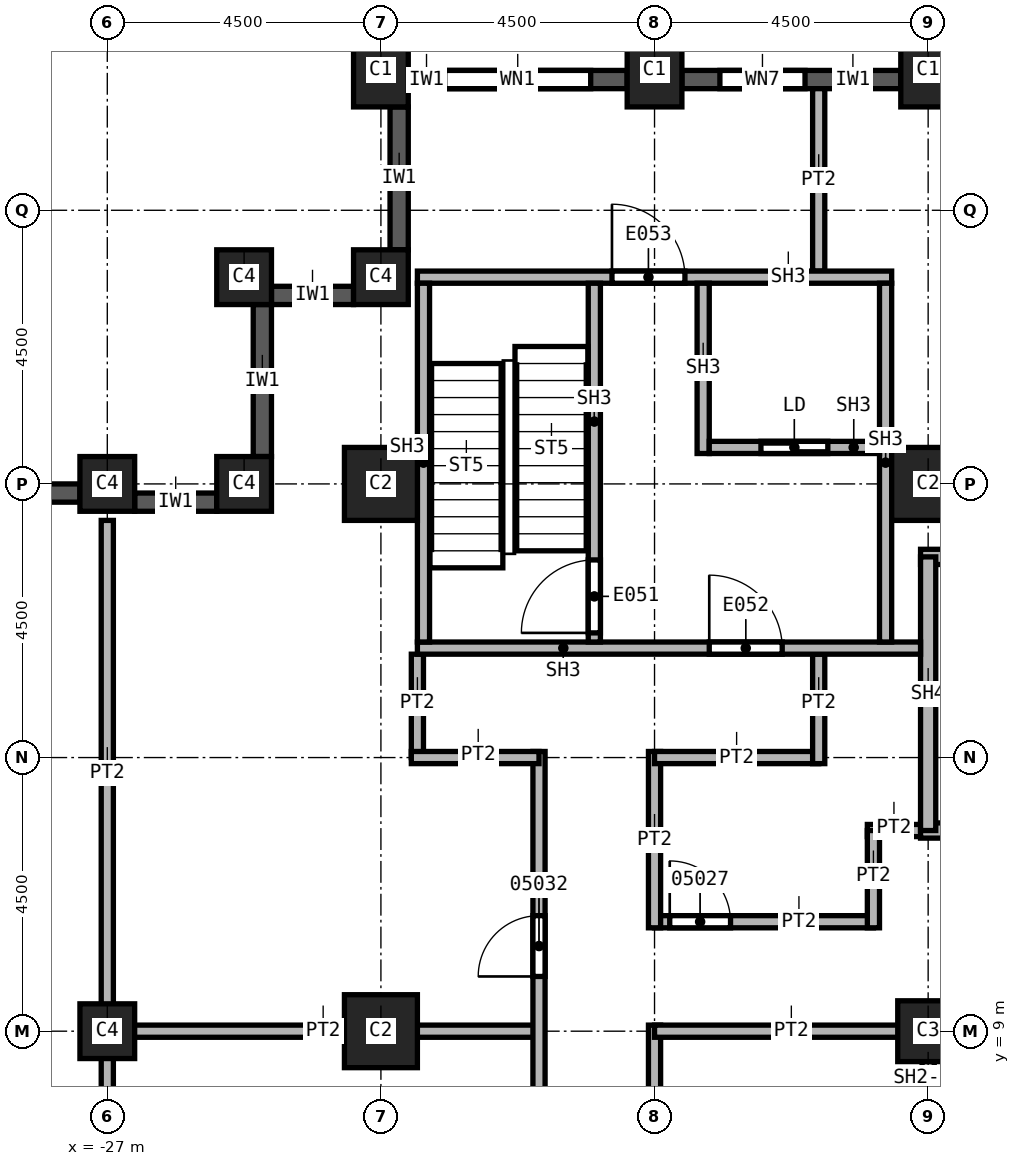
"""IFC4 building model, lengths in metres.
Left out: names, types, materials, properties, quantities, classifications, styles, units other than length and angle.
Written with IfcOpenShell. Run it as: python <this file> out.ifc"""

import sys

from ifc_helpers import new_model, si_unit, direction, frame, frame_2d, origin, origin_2d, place, context, subcontext, project, spatial, rectangle, extrude, element, fill, save


model = new_model("IFC4")
c1 = context("Model", 3, precision=1e-05, world=origin(), true_north=direction((0.0, 1.0)))
c2 = subcontext(c1, "Body", "Model", "MODEL_VIEW")
j1 = project(units=[si_unit("LENGTHUNIT", "METRE"), si_unit("PLANEANGLEUNIT", "RADIAN")], contexts=[c1])
p1 = place(None, origin())
s1 = spatial("IfcSite", under=j1, at=p1, CompositionType="ELEMENT")
p2 = place(p1, origin())
s2 = spatial("IfcBuilding", under=s1, at=p2, CompositionType="ELEMENT")
p3 = place(p2, frame((0.0, 0.0, 116.0)))
s3 = spatial("IfcBuildingStorey", under=s2, at=p3, CompositionType="ELEMENT", Elevation=116.0)
for number, where, z_axis, x_axis in (
    (1, (-13.5, 18.0, 0.0), (0.0, 0.0, 1.0), (1.0, 0.0, 0.0)),
    (2, (-22.5, 9.0, 0.0), (0.0, 0.0, 1.0), (1.0, 0.0, 0.0)),
    (3, (-22.5, 18.0, 0.0), (0.0, 0.0, 1.0), (1.0, 0.0, 0.0)),
):
    element("IfcColumn", number, at=place(p3, frame(where, z_axis=z_axis, x_axis=x_axis)), inside=s3, PredefinedType="COLUMN", context=c2, shape_type="SweptSolid", body=[
        extrude(rectangle(XDim=1.2, YDim=1.2, at=origin_2d()), origin(), (0.0, 0.0, 1.0), 3.6),
    ])
p4 = place(p3, frame((-13.5, 9.0, 0.0), z_axis=(0.0, 0.0, 1.0), x_axis=(1.0, 0.0, 0.0)))
e4 = element("IfcColumn", 4, at=p4, inside=s3, PredefinedType="COLUMN", context=c2, shape_type="SweptSolid", body=[
    extrude(rectangle(XDim=1.0, YDim=1.0, at=origin_2d()), origin(), (0.0, 0.0, 1.0), 3.6),
])
for number, where, z_axis, x_axis in (
    (5, (-13.5, 24.8, 0.0), (0.0, 0.0, 1.0), (1.0, 0.0, 0.0)),
    (6, (-18.0, 24.8, 0.0), (0.0, 0.0, 1.0), (1.0, 0.0, 0.0)),
    (7, (-22.5, 24.8, 0.0), (0.0, 0.0, 1.0), (1.0, 0.0, 0.0)),
):
    element("IfcColumn", number, at=place(p3, frame(where, z_axis=z_axis, x_axis=x_axis)), inside=s3, PredefinedType="COLUMN", context=c2, shape_type="SweptSolid", body=[
        extrude(rectangle(XDim=0.9, YDim=1.2, at=origin_2d()), origin(), (0.0, 0.0, 1.0), 3.6),
    ])
for number, where, z_axis, x_axis in (
    (8, (-27.0, 9.0, 0.0), (0.0, 0.0, 1.0), (1.0, 0.0, 0.0)),
    (9, (-27.0, 18.0, 0.0), (0.0, 0.0, 1.0), (1.0, 0.0, 0.0)),
    (10, (-22.5, 21.4, 0.0), (0.0, 0.0, 1.0), (1.0, 0.0, 0.0)),
    (11, (-24.75, 21.4, 0.0), (0.0, 0.0, 1.0), (1.0, 0.0, 0.0)),
    (12, (-24.75, 18.0, 0.0), (0.0, 0.0, 1.0), (1.0, 0.0, 0.0)),
):
    element("IfcColumn", number, at=place(p3, frame(where, z_axis=z_axis, x_axis=x_axis)), inside=s3, PredefinedType="COLUMN", context=c2, shape_type="SweptSolid", body=[
        extrude(rectangle(XDim=0.9, YDim=0.9, at=origin_2d()), origin(), (0.0, 0.0, 1.0), 3.6),
    ])
p5 = place(p3, frame((-22.2, 24.2, 0.0), z_axis=(0.0, 0.0, 1.0), x_axis=(0.0, -1.0, 0.0)))
e13 = element("IfcWall", 13, at=p5, inside=s3, PredefinedType="SOLIDWALL", context=c2, shape_type="SweptSolid", body=[
    extrude(rectangle(XDim=2.35, YDim=0.3, at=frame_2d((1.175, 0.0))), origin(), (0.0, 0.0, 1.0), 3.0),
])
p6 = place(p3, frame((-22.95, 21.1, 0.0), z_axis=(0.0, 0.0, 1.0), x_axis=(-1.0, 0.0, 0.0)))
e14 = element("IfcWall", 14, at=p6, inside=s3, PredefinedType="SOLIDWALL", context=c2, shape_type="SweptSolid", body=[
    extrude(rectangle(XDim=1.35, YDim=0.3, at=frame_2d((0.675, 0.0))), origin(), (0.0, 0.0, 1.0), 3.0),
])
p7 = place(p3, frame((-24.45, 20.95, 0.0), z_axis=(0.0, 0.0, 1.0), x_axis=(0.0, -1.0, 0.0)))
e15 = element("IfcWall", 15, at=p7, inside=s3, PredefinedType="SOLIDWALL", context=c2, shape_type="SweptSolid", body=[
    extrude(rectangle(XDim=2.5, YDim=0.3, at=frame_2d((1.25, 0.0))), origin(), (0.0, 0.0, 1.0), 3.0),
])
p8 = place(p3, frame((-25.2, 17.7, 0.0), z_axis=(0.0, 0.0, 1.0), x_axis=(-1.0, 0.0, 0.0)))
e16 = element("IfcWall", 16, at=p8, inside=s3, PredefinedType="SOLIDWALL", context=c2, shape_type="SweptSolid", body=[
    extrude(rectangle(XDim=1.35, YDim=0.3, at=frame_2d((0.675, 0.0))), origin(), (0.0, 0.0, 1.0), 3.0),
])
p9 = place(p3, frame((-27.45, 17.85, 0.0), z_axis=(0.0, 0.0, 1.0), x_axis=(-1.0, 0.0, 0.0)))
e17 = element("IfcWall", 17, at=p9, inside=s3, PredefinedType="SOLIDWALL", context=c2, shape_type="SweptSolid", body=[
    extrude(rectangle(XDim=3.6, YDim=0.3, at=frame_2d((1.8, 0.0))), origin(), (0.0, 0.0, 1.0), 3.0),
])
p10 = place(p9, frame((0.6, 0.0, 0.8)))
e18 = element("IfcOpeningElement", 18, at=p10, cuts=e17, PredefinedType="OPENING", context=c2, shape_type="SweptSolid", body=[
    extrude(rectangle(XDim=2.4, YDim=1.95, at=frame_2d((1.2, 0.975))), frame((0.0, 0.15, 0.0), z_axis=(0.0, -1.0, 0.0), x_axis=(1.0, 0.0, 0.0)), (0.0, 0.0, 1.0), 0.3),
])
p11 = place(p3, frame((-13.95, 24.65, 0.0), z_axis=(0.0, 0.0, 1.0), x_axis=(-1.0, 0.0, 0.0)))
e19 = element("IfcWall", 19, at=p11, inside=s3, PredefinedType="SOLIDWALL", context=c2, shape_type="SweptSolid", body=[
    extrude(rectangle(XDim=3.6, YDim=0.3, at=frame_2d((1.8, 0.0))), origin(), (0.0, 0.0, 1.0), 3.0),
])
p12 = place(p11, frame((1.575, 0.0, 0.8)))
e20 = element("IfcOpeningElement", 20, at=p12, cuts=e19, PredefinedType="OPENING", context=c2, shape_type="SweptSolid", body=[
    extrude(rectangle(XDim=1.4, YDim=1.95, at=frame_2d((0.7, 0.975))), frame((0.0, 0.15, 0.0), z_axis=(0.0, -1.0, 0.0), x_axis=(1.0, 0.0, 0.0)), (0.0, 0.0, 1.0), 0.3),
])
p13 = place(p3, frame((-18.45, 24.65, 0.0), z_axis=(0.0, 0.0, 1.0), x_axis=(-1.0, 0.0, 0.0)))
e21 = element("IfcWall", 21, at=p13, inside=s3, PredefinedType="SOLIDWALL", context=c2, shape_type="SweptSolid", body=[
    extrude(rectangle(XDim=3.6, YDim=0.3, at=frame_2d((1.8, 0.0))), origin(), (0.0, 0.0, 1.0), 3.0),
])
p14 = place(p13, frame((0.6, 0.0, 0.8)))
e22 = element("IfcOpeningElement", 22, at=p14, cuts=e21, PredefinedType="OPENING", context=c2, shape_type="SweptSolid", body=[
    extrude(rectangle(XDim=2.4, YDim=1.95, at=frame_2d((1.2, 0.975))), frame((0.0, 0.15, 0.0), z_axis=(0.0, -1.0, 0.0), x_axis=(1.0, 0.0, 0.0)), (0.0, 0.0, 1.0), 0.3),
])
p15 = place(p3, frame((-27.1, 9.0, 0.0), z_axis=(0.0, 0.0, 1.0), x_axis=(1.0, 0.0, 0.0)))
e23 = element("IfcWall", 23, at=p15, inside=s3, PredefinedType="PARTITIONING", context=c2, shape_type="SweptSolid", body=[
    extrude(rectangle(XDim=7.2, YDim=0.2, at=frame_2d((3.6, 0.0))), origin(), (0.0, 0.0, 1.0), 3.6),
])
p16 = place(p3, frame((-27.0, 3.75, 0.0), z_axis=(0.0, 0.0, 1.0), x_axis=(0.0, 1.0, 0.0)))
e24 = element("IfcWall", 24, at=p16, inside=s3, PredefinedType="PARTITIONING", context=c2, shape_type="SweptSolid", body=[
    extrude(rectangle(XDim=13.65, YDim=0.2, at=frame_2d((6.825, 0.0))), origin(), (0.0, 0.0, 1.0), 3.6),
])
p17 = place(p3, frame((-21.9, 13.5, 0.0), z_axis=(0.0, 0.0, 1.0), x_axis=(0.0, 1.0, 0.0)))
e25 = element("IfcWall", 25, at=p17, inside=s3, PredefinedType="PARTITIONING", context=c2, shape_type="SweptSolid", body=[
    extrude(rectangle(XDim=1.7, YDim=0.2, at=frame_2d((0.85, 0.0))), origin(), (0.0, 0.0, 1.0), 3.6),
])
p18 = place(p3, frame((-19.9, 3.65, 0.0), z_axis=(0.0, 0.0, 1.0), x_axis=(0.0, 1.0, 0.0)))
e26 = element("IfcWall", 26, at=p18, inside=s3, PredefinedType="PARTITIONING", context=c2, shape_type="SweptSolid", body=[
    extrude(rectangle(XDim=9.95, YDim=0.2, at=frame_2d((4.975, 0.0))), origin(), (0.0, 0.0, 1.0), 3.6),
])
p19 = place(p18, frame((6.25, 0.0, 0.0)))
e27 = element("IfcOpeningElement", 27, at=p19, cuts=e26, PredefinedType="OPENING", context=c2, shape_type="SweptSolid", body=[
    extrude(rectangle(XDim=1.0, YDim=2.1, at=frame_2d((0.5, 1.05))), frame((0.0, 0.1, 0.0), z_axis=(0.0, -1.0, 0.0), x_axis=(1.0, 0.0, 0.0)), (0.0, 0.0, 1.0), 0.2),
])
p20 = place(p3, frame((-19.9, 13.5, 0.0), z_axis=(0.0, 0.0, 1.0), x_axis=(-1.0, 0.0, 0.0)))
e28 = element("IfcWall", 28, at=p20, inside=s3, PredefinedType="PARTITIONING", context=c2, shape_type="SweptSolid", body=[
    extrude(rectangle(XDim=2.1, YDim=0.2, at=frame_2d((1.05, 0.0))), origin(), (0.0, 0.0, 1.0), 3.6),
])
p21 = place(p3, frame((-18.0, 9.1, 0.0), z_axis=(0.0, 0.0, 1.0), x_axis=(0.0, -1.0, 0.0)))
e29 = element("IfcWall", 29, at=p21, inside=s3, PredefinedType="PARTITIONING", context=c2, shape_type="SweptSolid", body=[
    extrude(rectangle(XDim=18.2, YDim=0.2, at=frame_2d((9.1, 0.0))), origin(), (0.0, 0.0, 1.0), 3.6),
])
p22 = place(p21, frame((16.9, 0.0, 0.0)))
e30 = element("IfcOpeningElement", 30, at=p22, cuts=e29, PredefinedType="OPENING", context=c2, shape_type="SweptSolid", body=[
    extrude(rectangle(XDim=1.0, YDim=2.1, at=frame_2d((0.5, 1.05))), frame((0.0, 0.1, 0.0), z_axis=(0.0, -1.0, 0.0), x_axis=(1.0, 0.0, 0.0)), (0.0, 0.0, 1.0), 0.2),
])
p23 = place(p21, frame((7.3, 0.0, 0.0)))
e31 = element("IfcOpeningElement", 31, at=p23, cuts=e29, PredefinedType="OPENING", context=c2, shape_type="SweptSolid", body=[
    extrude(rectangle(XDim=1.0, YDim=2.1, at=frame_2d((0.5, 1.05))), frame((0.0, 0.1, 0.0), z_axis=(0.0, -1.0, 0.0), x_axis=(1.0, 0.0, 0.0)), (0.0, 0.0, 1.0), 0.2),
])
p24 = place(p3, frame((-18.0, 10.8, 0.0), z_axis=(0.0, 0.0, 1.0), x_axis=(1.0, 0.0, 0.0)))
e32 = element("IfcWall", 32, at=p24, inside=s3, PredefinedType="PARTITIONING", context=c2, shape_type="SweptSolid", body=[
    extrude(rectangle(XDim=3.6, YDim=0.2, at=frame_2d((1.8, 0.0))), origin(), (0.0, 0.0, 1.0), 3.6),
])
p25 = place(p24, frame((0.25, 0.0, 0.0)))
e33 = element("IfcOpeningElement", 33, at=p25, cuts=e32, PredefinedType="OPENING", context=c2, shape_type="SweptSolid", body=[
    extrude(rectangle(XDim=1.0, YDim=2.1, at=frame_2d((0.5, 1.05))), frame((0.0, 0.1, 0.0), z_axis=(0.0, -1.0, 0.0), x_axis=(1.0, 0.0, 0.0)), (0.0, 0.0, 1.0), 0.2),
])
p26 = place(p3, frame((-18.0, 13.6, 0.0), z_axis=(0.0, 0.0, 1.0), x_axis=(0.0, -1.0, 0.0)))
e34 = element("IfcWall", 34, at=p26, inside=s3, PredefinedType="PARTITIONING", context=c2, shape_type="SweptSolid", body=[
    extrude(rectangle(XDim=2.9, YDim=0.2, at=frame_2d((1.45, 0.0))), origin(), (0.0, 0.0, 1.0), 3.6),
])
p27 = place(p3, frame((-15.3, 13.5, 0.0), z_axis=(0.0, 0.0, 1.0), x_axis=(-1.0, 0.0, 0.0)))
e35 = element("IfcWall", 35, at=p27, inside=s3, PredefinedType="PARTITIONING", context=c2, shape_type="SweptSolid", body=[
    extrude(rectangle(XDim=2.7, YDim=0.2, at=frame_2d((1.35, 0.0))), origin(), (0.0, 0.0, 1.0), 3.6),
])
p28 = place(p3, frame((-15.3, 15.2, 0.0), z_axis=(0.0, 0.0, 1.0), x_axis=(0.0, -1.0, 0.0)))
e36 = element("IfcWall", 36, at=p28, inside=s3, PredefinedType="PARTITIONING", context=c2, shape_type="SweptSolid", body=[
    extrude(rectangle(XDim=1.8, YDim=0.2, at=frame_2d((0.9, 0.0))), origin(), (0.0, 0.0, 1.0), 3.6),
])
p29 = place(p3, frame((-15.3, 24.5, 0.0), z_axis=(0.0, 0.0, 1.0), x_axis=(0.0, -1.0, 0.0)))
e37 = element("IfcWall", 37, at=p29, inside=s3, PredefinedType="PARTITIONING", context=c2, shape_type="SweptSolid", body=[
    extrude(rectangle(XDim=3.0, YDim=0.2, at=frame_2d((1.5, 0.0))), origin(), (0.0, 0.0, 1.0), 3.6),
])
p30 = place(p3, frame((-14.5, 12.3, 0.0), z_axis=(0.0, 0.0, 1.0), x_axis=(1.0, 0.0, 0.0)))
e38 = element("IfcWall", 38, at=p30, inside=s3, PredefinedType="PARTITIONING", context=c2, shape_type="SweptSolid", body=[
    extrude(rectangle(XDim=1.125, YDim=0.2, at=frame_2d((0.562, 0.0))), origin(), (0.0, 0.0, 1.0), 3.6),
])
p31 = place(p3, frame((-13.5, 9.0, 0.0), z_axis=(0.0, 0.0, 1.0), x_axis=(-1.0, 0.0, 0.0)))
e39 = element("IfcWall", 39, at=p31, inside=s3, PredefinedType="PARTITIONING", context=c2, shape_type="SweptSolid", body=[
    extrude(rectangle(XDim=4.5, YDim=0.2, at=frame_2d((2.25, 0.0))), origin(), (0.0, 0.0, 1.0), 3.6),
])
p32 = place(p3, frame((-14.4, 10.7, 0.0), z_axis=(0.0, 0.0, 1.0), x_axis=(0.0, 1.0, 0.0)))
e40 = element("IfcWall", 40, at=p32, inside=s3, PredefinedType="PARTITIONING", context=c2, shape_type="SweptSolid", body=[
    extrude(rectangle(XDim=1.6, YDim=0.2, at=frame_2d((0.8, 0.0))), origin(), (0.0, 0.0, 1.0), 3.6),
])
p33 = place(p3, frame((-13.6, 9.0, 0.0), z_axis=(0.0, 0.0, 1.0), x_axis=(1.0, 0.0, 0.0)))
e41 = element("IfcWall", 41, at=p33, inside=s3, PredefinedType="SOLIDWALL", context=c2, shape_type="SweptSolid", body=[
    extrude(rectangle(XDim=3.1, YDim=0.2, at=frame_2d((1.55, 0.0))), origin(), (0.0, 0.0, 1.0), 2.838),
])
p34 = place(p33, frame((0.85, 0.0, 0.0)))
e42 = element("IfcOpeningElement", 42, at=p34, cuts=e41, PredefinedType="OPENING", context=c2, shape_type="SweptSolid", body=[
    extrude(rectangle(XDim=1.1, YDim=2.1, at=frame_2d((0.55, 1.05))), frame((0.0, 0.1, 0.0), z_axis=(0.0, -1.0, 0.0), x_axis=(1.0, 0.0, 0.0)), (0.0, 0.0, 1.0), 0.2),
])
p35 = place(p3, frame((-13.5, 7.5, 0.0), z_axis=(0.0, 0.0, 1.0), x_axis=(0.0, 1.0, 0.0)))
e43 = element("IfcWall", 43, at=p35, inside=s3, PredefinedType="SOLIDWALL", context=c2, shape_type="SweptSolid", body=[
    extrude(rectangle(XDim=1.6, YDim=0.2, at=frame_2d((0.8, 0.0))), origin(), (0.0, 0.0, 1.0), 2.838),
])
p36 = place(p3, frame((-13.625, 12.3, 0.0), z_axis=(0.0, 0.0, 1.0), x_axis=(1.0, 0.0, 0.0)))
e44 = element("IfcWall", 44, at=p36, inside=s3, PredefinedType="SOLIDWALL", context=c2, shape_type="SweptSolid", body=[
    extrude(rectangle(XDim=9.25, YDim=0.25, at=frame_2d((4.625, 0.0))), origin(), (0.0, 0.0, 1.0), 3.6),
])
p37 = place(p36, frame((0.85, 0.0, 0.0)))
e45 = element("IfcOpeningElement", 45, at=p37, cuts=e44, PredefinedType="OPENING", context=c2, shape_type="SweptSolid", body=[
    extrude(rectangle(XDim=1.2, YDim=2.1, at=frame_2d((0.6, 1.05))), frame((0.0, 0.125, 0.0), z_axis=(0.0, -1.0, 0.0), x_axis=(1.0, 0.0, 0.0)), (0.0, 0.0, 1.0), 0.25),
])
p38 = place(p3, frame((-13.625, 16.8, 0.0), z_axis=(0.0, 0.0, 1.0), x_axis=(1.0, 0.0, 0.0)))
e46 = element("IfcWall", 46, at=p38, inside=s3, PredefinedType="SOLIDWALL", context=c2, shape_type="SweptSolid", body=[
    extrude(rectangle(XDim=9.25, YDim=0.25, at=frame_2d((4.625, 0.0))), origin(), (0.0, 0.0, 1.0), 3.6),
])
p39 = place(p3, frame((-13.5, 12.3, 0.0), z_axis=(0.0, 0.0, 1.0), x_axis=(0.0, 1.0, 0.0)))
e47 = element("IfcWall", 47, at=p39, inside=s3, PredefinedType="SOLIDWALL", context=c2, shape_type="SweptSolid", body=[
    extrude(rectangle(XDim=4.5, YDim=0.25, at=frame_2d((2.25, 0.0))), origin(), (0.0, 0.0, 1.0), 3.6),
])
p40 = place(p3, frame((-21.9, 15.3, 0.0), z_axis=(0.0, 0.0, 1.0), x_axis=(1.0, 0.0, 0.0)))
e48 = element("IfcWall", 48, at=p40, inside=s3, PredefinedType="SOLIDWALL", context=c2, shape_type="SweptSolid", body=[
    extrude(rectangle(XDim=8.275, YDim=0.2, at=frame_2d((4.137, 0.0))), origin(), (0.0, 0.0, 1.0), 3.6),
])
p41 = place(p40, frame((4.8, 0.0, 0.0)))
e49 = element("IfcOpeningElement", 49, at=p41, cuts=e48, PredefinedType="OPENING", context=c2, shape_type="SweptSolid", body=[
    extrude(rectangle(XDim=1.2, YDim=2.1, at=frame_2d((0.6, 1.05))), frame((0.0, 0.1, 0.0), z_axis=(0.0, -1.0, 0.0), x_axis=(1.0, 0.0, 0.0)), (0.0, 0.0, 1.0), 0.2),
])
p42 = place(p3, frame((-21.9, 21.4, 0.0), z_axis=(0.0, 0.0, 1.0), x_axis=(1.0, 0.0, 0.0)))
e50 = element("IfcWall", 50, at=p42, inside=s3, PredefinedType="SOLIDWALL", context=c2, shape_type="SweptSolid", body=[
    extrude(rectangle(XDim=7.8, YDim=0.2, at=frame_2d((3.9, 0.0))), origin(), (0.0, 0.0, 1.0), 3.6),
])
p43 = place(p42, frame((3.2, 0.0, 0.0)))
e51 = element("IfcOpeningElement", 51, at=p43, cuts=e50, PredefinedType="OPENING", context=c2, shape_type="SweptSolid", body=[
    extrude(rectangle(XDim=1.2, YDim=2.1, at=frame_2d((0.6, 1.05))), frame((0.0, 0.1, 0.0), z_axis=(0.0, -1.0, 0.0), x_axis=(1.0, 0.0, 0.0)), (0.0, 0.0, 1.0), 0.2),
])
for number, where, z_axis, x_axis in (
    (52, (-21.8, 15.4, 0.0), (0.0, 0.0, 1.0), (0.0, 1.0, 0.0)),
    (53, (-14.2, 15.4, 0.0), (0.0, 0.0, 1.0), (0.0, 1.0, 0.0)),
):
    element("IfcWall", number, at=place(p3, frame(where, z_axis=z_axis, x_axis=x_axis)), inside=s3, PredefinedType="SOLIDWALL", context=c2, shape_type="SweptSolid", body=[
        extrude(rectangle(XDim=5.9, YDim=0.2, at=frame_2d((2.95, 0.0))), origin(), (0.0, 0.0, 1.0), 3.6),
    ])
p44 = place(p3, frame((-18.99, 15.4, 0.0), z_axis=(0.0, 0.0, 1.0), x_axis=(0.0, 1.0, 0.0)))
e54 = element("IfcWall", 54, at=p44, inside=s3, PredefinedType="SOLIDWALL", context=c2, shape_type="SweptSolid", body=[
    extrude(rectangle(XDim=5.9, YDim=0.2, at=frame_2d((2.95, 0.0))), origin(), (0.0, 0.0, 1.0), 3.6),
])
p45 = place(p44, frame((0.15, 0.0, 0.0)))
e55 = element("IfcOpeningElement", 55, at=p45, cuts=e54, PredefinedType="OPENING", context=c2, shape_type="SweptSolid", body=[
    extrude(rectangle(XDim=1.2, YDim=2.1, at=frame_2d((0.6, 1.05))), frame((0.0, 0.1, 0.0), z_axis=(0.0, -1.0, 0.0), x_axis=(1.0, 0.0, 0.0)), (0.0, 0.0, 1.0), 0.2),
])
p46 = place(p3, frame((-17.2, 18.5, 0.0), z_axis=(0.0, 0.0, 1.0), x_axis=(0.0, 1.0, 0.0)))
e56 = element("IfcWall", 56, at=p46, inside=s3, PredefinedType="SOLIDWALL", context=c2, shape_type="SweptSolid", body=[
    extrude(rectangle(XDim=2.8, YDim=0.2, at=frame_2d((1.4, 0.0))), origin(), (0.0, 0.0, 1.0), 3.6),
])
p47 = place(p3, frame((-17.1, 18.6, 0.0), z_axis=(0.0, 0.0, 1.0), x_axis=(1.0, 0.0, 0.0)))
e57 = element("IfcWall", 57, at=p47, inside=s3, PredefinedType="SOLIDWALL", context=c2, shape_type="SweptSolid", body=[
    extrude(rectangle(XDim=2.8, YDim=0.2, at=frame_2d((1.4, 0.0))), origin(), (0.0, 0.0, 1.0), 3.6),
])
p48 = place(p47, frame((0.85, 0.0, 0.0)))
e58 = element("IfcOpeningElement", 58, at=p48, cuts=e57, PredefinedType="OPENING", context=c2, shape_type="SweptSolid", body=[
    extrude(rectangle(XDim=1.1, YDim=2.1, at=frame_2d((0.55, 1.05))), frame((0.0, 0.1, 0.0), z_axis=(0.0, -1.0, 0.0), x_axis=(1.0, 0.0, 0.0)), (0.0, 0.0, 1.0), 0.2),
])
p49 = place(p14, origin())
e59 = element("IfcWindow", 59, at=p49, inside=s3, PartitioningType="SINGLE_PANEL", PredefinedType="WINDOW", context=c2, shape_type="SweptSolid", body=[
    extrude(rectangle(XDim=2.4, YDim=1.95, at=frame_2d((1.2, 0.975))), frame((0.0, 0.03, 0.0), z_axis=(0.0, -1.0, 0.0), x_axis=(1.0, 0.0, 0.0)), (0.0, 0.0, 1.0), 0.06),
])
fill(e22, e59)
p50 = place(p25, origin())
e60 = element("IfcDoor", 60, at=p50, inside=s3, OperationType="SINGLE_SWING_RIGHT", PredefinedType="DOOR", context=c2, shape_type="SweptSolid", body=[
    extrude(rectangle(XDim=1.0, YDim=2.1, at=frame_2d((0.5, 1.05))), frame((0.0, 0.025, 0.0), z_axis=(0.0, -1.0, 0.0), x_axis=(1.0, 0.0, 0.0)), (0.0, 0.0, 1.0), 0.05),
])
fill(e33, e60)
p51 = place(p19, origin())
e61 = element("IfcDoor", 61, at=p51, inside=s3, OperationType="SINGLE_SWING_LEFT", PredefinedType="DOOR", context=c2, shape_type="SweptSolid", body=[
    extrude(rectangle(XDim=1.0, YDim=2.1, at=frame_2d((0.5, 1.05))), frame((0.0, 0.025, 0.0), z_axis=(0.0, -1.0, 0.0), x_axis=(1.0, 0.0, 0.0)), (0.0, 0.0, 1.0), 0.05),
])
fill(e27, e61)
p52 = place(p45, origin())
e62 = element("IfcDoor", 62, at=p52, inside=s3, OperationType="SINGLE_SWING_LEFT", PredefinedType="DOOR", context=c2, shape_type="SweptSolid", body=[
    extrude(rectangle(XDim=1.2, YDim=2.1, at=frame_2d((0.6, 1.05))), frame((0.0, 0.025, 0.0), z_axis=(0.0, -1.0, 0.0), x_axis=(1.0, 0.0, 0.0)), (0.0, 0.0, 1.0), 0.05),
])
fill(e55, e62)
p53 = place(p48, origin())
e63 = element("IfcDoor", 63, at=p53, inside=s3, OperationType="SLIDING_TO_LEFT", PredefinedType="DOOR", context=c2, shape_type="SweptSolid", body=[
    extrude(rectangle(XDim=1.1, YDim=2.1, at=frame_2d((0.55, 1.05))), frame((0.0, 0.025, 0.0), z_axis=(0.0, -1.0, 0.0), x_axis=(1.0, 0.0, 0.0)), (0.0, 0.0, 1.0), 0.05),
])
fill(e58, e63)
p54 = place(p41, origin())
e64 = element("IfcDoor", 64, at=p54, inside=s3, OperationType="SINGLE_SWING_RIGHT", PredefinedType="DOOR", context=c2, shape_type="SweptSolid", body=[
    extrude(rectangle(XDim=1.2, YDim=2.1, at=frame_2d((0.6, 1.05))), frame((0.0, 0.025, 0.0), z_axis=(0.0, -1.0, 0.0), x_axis=(1.0, 0.0, 0.0)), (0.0, 0.0, 1.0), 0.05),
])
fill(e49, e64)
p55 = place(p43, origin())
e65 = element("IfcDoor", 65, at=p55, inside=s3, OperationType="SINGLE_SWING_LEFT", PredefinedType="DOOR", context=c2, shape_type="SweptSolid", body=[
    extrude(rectangle(XDim=1.2, YDim=2.1, at=frame_2d((0.6, 1.05))), frame((0.0, 0.025, 0.0), z_axis=(0.0, -1.0, 0.0), x_axis=(1.0, 0.0, 0.0)), (0.0, 0.0, 1.0), 0.05),
])
fill(e51, e65)
p56 = place(p12, origin())
e66 = element("IfcWindow", 66, at=p56, inside=s3, PartitioningType="SINGLE_PANEL", PredefinedType="WINDOW", context=c2, shape_type="SweptSolid", body=[
    extrude(rectangle(XDim=1.4, YDim=1.95, at=frame_2d((0.7, 0.975))), frame((0.0, 0.03, 0.0), z_axis=(0.0, -1.0, 0.0), x_axis=(1.0, 0.0, 0.0)), (0.0, 0.0, 1.0), 0.06),
])
fill(e20, e66)
save(model, sys.argv[1])
